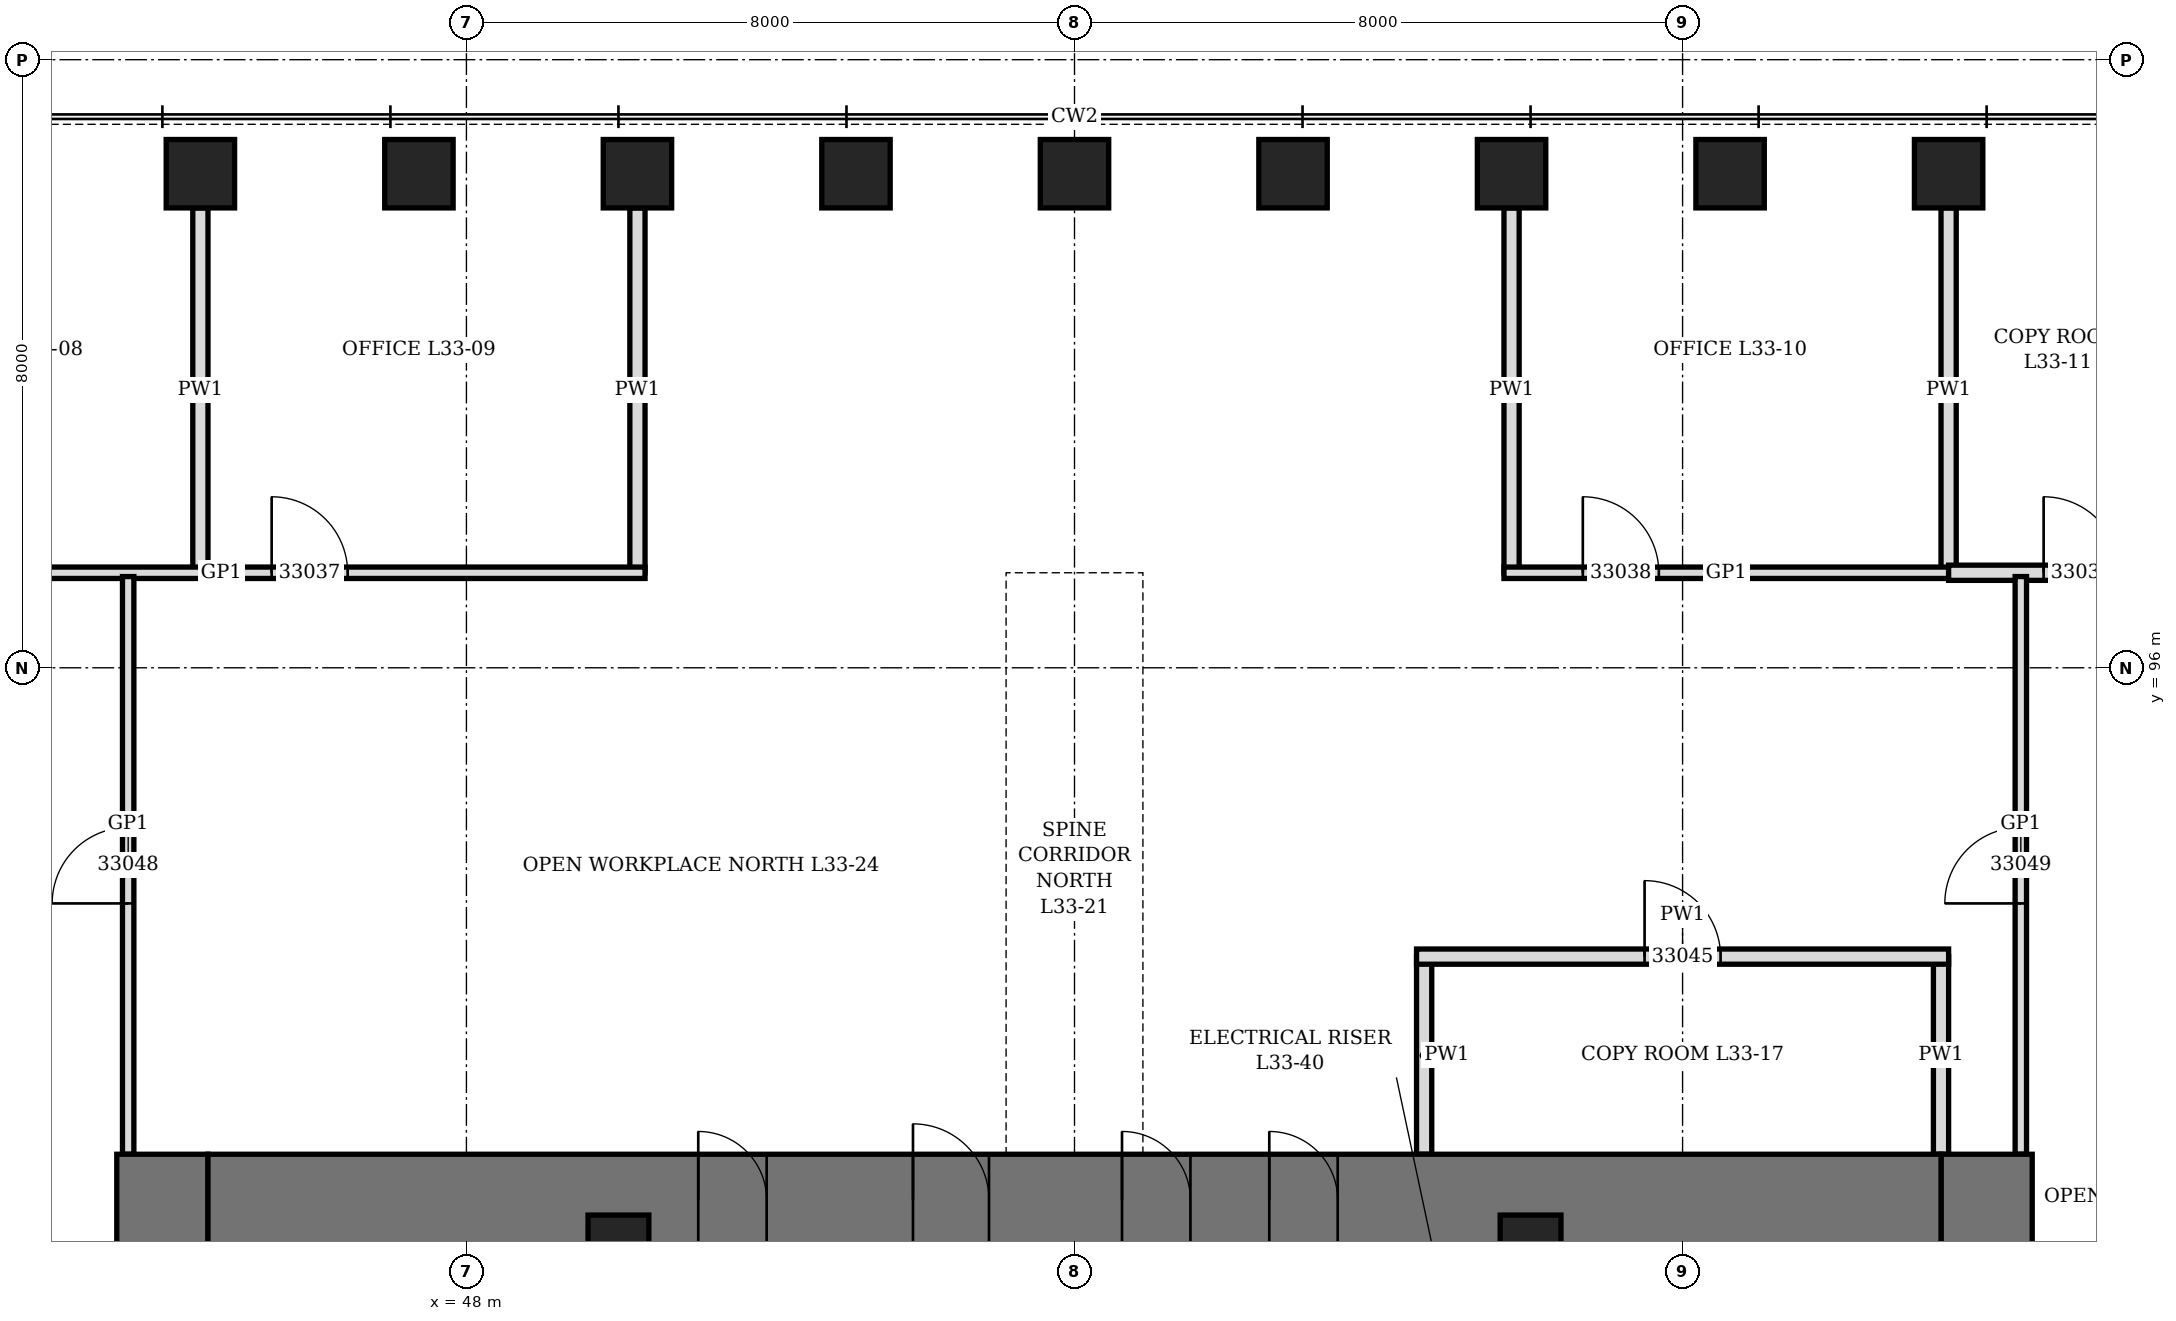
"""IFC4 building model, lengths in metres.
Left out: names, types, materials, properties, quantities, classifications, styles, units other than length and angle.
Written with IfcOpenShell. Run it as: python <this file> out.ifc"""

import sys

from ifc_helpers import new_model, si_unit, direction, frame, frame_2d, origin, origin_2d, place, context, subcontext, project, spatial, rectangle, hollow_rectangle, extrude, element, fill, save


model = new_model("IFC4")
c1 = context("Model", 3, precision=1e-05, world=origin(), true_north=direction((0.0, 1.0)))
c2 = subcontext(c1, "Body", "Model", "MODEL_VIEW")
j1 = project(units=[si_unit("LENGTHUNIT", "METRE"), si_unit("PLANEANGLEUNIT", "RADIAN")], contexts=[c1])
p1 = place(None, origin())
s1 = spatial("IfcSite", under=j1, at=p1, CompositionType="ELEMENT")
p2 = place(p1, origin())
s2 = spatial("IfcBuilding", under=s1, at=p2, CompositionType="ELEMENT")
p3 = place(p2, frame((0.0, 0.0, 150.1)))
s3 = spatial("IfcBuildingStorey", under=s2, at=p3, CompositionType="ELEMENT", Elevation=150.1)
for number, where, z_axis, x_axis in (
    (1, (67.5, 102.5, 0.0), (0.0, 0.0, 1.0), (1.0, 0.0, 0.0)),
    (2, (64.625, 102.5, 0.0), (0.0, 0.0, 1.0), (1.0, 0.0, 0.0)),
    (3, (61.75, 102.5, 0.0), (0.0, 0.0, 1.0), (1.0, 0.0, 0.0)),
    (4, (58.875, 102.5, 0.0), (0.0, 0.0, 1.0), (1.0, 0.0, 0.0)),
    (5, (56.0, 102.5, 0.0), (0.0, 0.0, 1.0), (1.0, 0.0, 0.0)),
    (6, (53.125, 102.5, 0.0), (0.0, 0.0, 1.0), (1.0, 0.0, 0.0)),
    (7, (50.25, 102.5, 0.0), (0.0, 0.0, 1.0), (1.0, 0.0, 0.0)),
    (8, (47.375, 102.5, 0.0), (0.0, 0.0, 1.0), (1.0, 0.0, 0.0)),
    (9, (44.5, 102.5, 0.0), (0.0, 0.0, 1.0), (1.0, 0.0, 0.0)),
):
    element("IfcColumn", number, at=place(p3, frame(where, z_axis=z_axis, x_axis=x_axis)), inside=s3, PredefinedType="COLUMN", context=c2, shape_type="SweptSolid", body=[
        extrude(hollow_rectangle(XDim=0.9, YDim=0.9, WallThickness=0.12, at=origin_2d()), origin(), (0.0, 0.0, 1.0), 4.2),
    ])
p4 = place(p3, frame((44.0, 70.4, 0.0), z_axis=(0.0, 0.0, 1.0), x_axis=(0.0, 1.0, 0.0)))
e10 = element("IfcWall", 10, at=p4, inside=s3, PredefinedType="SHEAR", context=c2, shape_type="SweptSolid", body=[
    extrude(rectangle(XDim=19.2, YDim=1.2, at=frame_2d((9.6, 0.0))), origin(), (0.0, 0.0, 1.0), 4.2),
])
p5 = place(p4, frame((8.6, 0.0, 0.0)))
e11 = element("IfcOpeningElement", 11, at=p5, cuts=e10, PredefinedType="OPENING", context=c2, shape_type="SweptSolid", body=[
    extrude(rectangle(XDim=2.0, YDim=2.4, at=frame_2d((1.0, 1.2))), frame((0.0, 0.61, 0.0), z_axis=(0.0, -1.0, 0.0), x_axis=(1.0, 0.0, 0.0)), (0.0, 0.0, 1.0), 1.22),
])
p6 = place(p3, frame((68.0, 70.4, 0.0), z_axis=(0.0, 0.0, 1.0), x_axis=(0.0, 1.0, 0.0)))
e12 = element("IfcWall", 12, at=p6, inside=s3, PredefinedType="SHEAR", context=c2, shape_type="SweptSolid", body=[
    extrude(rectangle(XDim=19.2, YDim=1.2, at=frame_2d((9.6, 0.0))), origin(), (0.0, 0.0, 1.0), 4.2),
])
p7 = place(p6, frame((8.6, 0.0, 0.0)))
e13 = element("IfcOpeningElement", 13, at=p7, cuts=e12, PredefinedType="OPENING", context=c2, shape_type="SweptSolid", body=[
    extrude(rectangle(XDim=2.0, YDim=2.4, at=frame_2d((1.0, 1.2))), frame((0.0, 0.61, 0.0), z_axis=(0.0, -1.0, 0.0), x_axis=(1.0, 0.0, 0.0)), (0.0, 0.0, 1.0), 1.22),
])
p8 = place(p3, frame((44.6, 89.0, 0.0), z_axis=(0.0, 0.0, 1.0), x_axis=(1.0, 0.0, 0.0)))
e14 = element("IfcWall", 14, at=p8, inside=s3, PredefinedType="SHEAR", context=c2, shape_type="SweptSolid", body=[
    extrude(rectangle(XDim=22.8, YDim=1.2, at=frame_2d((11.4, 0.0))), origin(), (0.0, 0.0, 1.0), 4.2),
])
p9 = place(p8, frame((9.275, 0.0, 0.0)))
e15 = element("IfcOpeningElement", 15, at=p9, cuts=e14, PredefinedType="OPENING", context=c2, shape_type="SweptSolid", body=[
    extrude(rectangle(XDim=1.0, YDim=2.1, at=frame_2d((0.5, 1.05))), frame((0.0, 0.61, 0.0), z_axis=(0.0, -1.0, 0.0), x_axis=(1.0, 0.0, 0.0)), (0.0, 0.0, 1.0), 1.22),
])
p10 = place(p8, frame((6.45, 0.0, 0.0)))
e16 = element("IfcOpeningElement", 16, at=p10, cuts=e14, PredefinedType="OPENING", context=c2, shape_type="SweptSolid", body=[
    extrude(rectangle(XDim=0.9, YDim=2.1, at=frame_2d((0.45, 1.05))), frame((0.0, 0.61, 0.0), z_axis=(0.0, -1.0, 0.0), x_axis=(1.0, 0.0, 0.0)), (0.0, 0.0, 1.0), 1.22),
])
p11 = place(p8, frame((12.025, 0.0, 0.0)))
e17 = element("IfcOpeningElement", 17, at=p11, cuts=e14, PredefinedType="OPENING", context=c2, shape_type="SweptSolid", body=[
    extrude(rectangle(XDim=0.9, YDim=2.1, at=frame_2d((0.45, 1.05))), frame((0.0, 0.61, 0.0), z_axis=(0.0, -1.0, 0.0), x_axis=(1.0, 0.0, 0.0)), (0.0, 0.0, 1.0), 1.22),
])
p12 = place(p8, frame((13.962, 0.0, 0.0)))
e18 = element("IfcOpeningElement", 18, at=p12, cuts=e14, PredefinedType="OPENING", context=c2, shape_type="SweptSolid", body=[
    extrude(rectangle(XDim=0.9, YDim=2.1, at=frame_2d((0.45, 1.05))), frame((0.0, 0.61, 0.0), z_axis=(0.0, -1.0, 0.0), x_axis=(1.0, 0.0, 0.0)), (0.0, 0.0, 1.0), 1.22),
])
for number, where, z_axis, x_axis in (
    (19, (50.0, 88.4, 0.0), (0.0, 0.0, 1.0), (1.0, 0.0, 0.0)),
    (20, (62.0, 88.4, 0.0), (0.0, 0.0, 1.0), (1.0, 0.0, 0.0)),
):
    element("IfcColumn", number, at=place(p3, frame(where, z_axis=z_axis, x_axis=x_axis)), inside=s3, PredefinedType="COLUMN", context=c2, shape_type="SweptSolid", body=[
        extrude(hollow_rectangle(XDim=0.8, YDim=0.8, WallThickness=0.1, at=origin_2d()), origin(), (0.0, 0.0, 1.0), 4.2),
    ])
p13 = place(p3, frame((44.5, 97.25, 0.0), z_axis=(0.0, 0.0, 1.0), x_axis=(0.0, 1.0, 0.0)))
e21 = element("IfcWall", 21, at=p13, inside=s3, PredefinedType="PARTITIONING", context=c2, shape_type="SweptSolid", body=[
    extrude(rectangle(XDim=4.8, YDim=0.2, at=frame_2d((2.4, 0.0))), origin(), (0.0, 0.0, 1.0), 2.74),
])
for number, where, z_axis, x_axis in (
    (22, (50.25, 97.25, 0.0), (0.0, 0.0, 1.0), (0.0, 1.0, 0.0)),
    (23, (61.75, 97.25, 0.0), (0.0, 0.0, 1.0), (0.0, 1.0, 0.0)),
):
    element("IfcWall", number, at=place(p3, frame(where, z_axis=z_axis, x_axis=x_axis)), inside=s3, PredefinedType="PARTITIONING", context=c2, shape_type="SweptSolid", body=[
        extrude(rectangle(XDim=4.8, YDim=0.2, at=frame_2d((2.4, 0.0))), origin(), (0.0, 0.0, 1.0), 3.278),
    ])
p14 = place(p3, frame((67.5, 97.25, 0.0), z_axis=(0.0, 0.0, 1.0), x_axis=(0.0, 1.0, 0.0)))
e24 = element("IfcWall", 24, at=p14, inside=s3, PredefinedType="PARTITIONING", context=c2, shape_type="SweptSolid", body=[
    extrude(rectangle(XDim=4.8, YDim=0.2, at=frame_2d((2.4, 0.0))), origin(), (0.0, 0.0, 1.0), 2.74),
])
p15 = place(p3, frame((60.6, 89.6, 0.0), z_axis=(0.0, 0.0, 1.0), x_axis=(0.0, 1.0, 0.0)))
e25 = element("IfcWall", 25, at=p15, inside=s3, PredefinedType="PARTITIONING", context=c2, shape_type="SweptSolid", body=[
    extrude(rectangle(XDim=2.6, YDim=0.2, at=frame_2d((1.3, 0.0))), origin(), (0.0, 0.0, 1.0), 4.04),
])
p16 = place(p3, frame((67.4, 89.6, 0.0), z_axis=(0.0, 0.0, 1.0), x_axis=(0.0, 1.0, 0.0)))
e26 = element("IfcWall", 26, at=p16, inside=s3, PredefinedType="PARTITIONING", context=c2, shape_type="SweptSolid", body=[
    extrude(rectangle(XDim=2.6, YDim=0.2, at=frame_2d((1.3, 0.0))), origin(), (0.0, 0.0, 1.0), 2.74),
])
p17 = place(p3, frame((60.5, 92.2, 0.0), z_axis=(0.0, 0.0, 1.0), x_axis=(1.0, 0.0, 0.0)))
e27 = element("IfcWall", 27, at=p17, inside=s3, PredefinedType="PARTITIONING", context=c2, shape_type="SweptSolid", body=[
    extrude(rectangle(XDim=7.0, YDim=0.2, at=frame_2d((3.5, 0.0))), origin(), (0.0, 0.0, 1.0), 4.04),
])
p18 = place(p17, frame((3.0, 0.0, 0.0)))
e28 = element("IfcOpeningElement", 28, at=p18, cuts=e27, PredefinedType="OPENING", context=c2, shape_type="SweptSolid", body=[
    extrude(rectangle(XDim=1.0, YDim=2.1, at=frame_2d((0.5, 1.05))), frame((0.0, 0.11, 0.0), z_axis=(0.0, -1.0, 0.0), x_axis=(1.0, 0.0, 0.0)), (0.0, 0.0, 1.0), 0.22),
])
p19 = place(p3, frame((39.2, 97.25, 0.0), z_axis=(0.0, 0.0, 1.0), x_axis=(1.0, 0.0, 0.0)))
e29 = element("IfcWall", 29, at=p19, inside=s3, PredefinedType="PARTITIONING", context=c2, shape_type="SweptSolid", body=[
    extrude(rectangle(XDim=11.15, YDim=0.15, at=frame_2d((5.575, 0.0))), origin(), (0.0, 0.0, 1.0), 4.04),
])
p20 = place(p19, frame((0.488, 0.0, 0.0)))
e30 = element("IfcOpeningElement", 30, at=p20, cuts=e29, PredefinedType="OPENING", context=c2, shape_type="SweptSolid", body=[
    extrude(rectangle(XDim=1.0, YDim=2.4, at=frame_2d((0.5, 1.2))), frame((0.0, 0.085, 0.0), z_axis=(0.0, -1.0, 0.0), x_axis=(1.0, 0.0, 0.0)), (0.0, 0.0, 1.0), 0.17),
])
p21 = place(p19, frame((6.238, 0.0, 0.0)))
e31 = element("IfcOpeningElement", 31, at=p21, cuts=e29, PredefinedType="OPENING", context=c2, shape_type="SweptSolid", body=[
    extrude(rectangle(XDim=1.0, YDim=2.1, at=frame_2d((0.5, 1.05))), frame((0.0, 0.085, 0.0), z_axis=(0.0, -1.0, 0.0), x_axis=(1.0, 0.0, 0.0)), (0.0, 0.0, 1.0), 0.17),
])
p22 = place(p3, frame((61.65, 97.25, 0.0), z_axis=(0.0, 0.0, 1.0), x_axis=(1.0, 0.0, 0.0)))
e32 = element("IfcWall", 32, at=p22, inside=s3, PredefinedType="PARTITIONING", context=c2, shape_type="SweptSolid", body=[
    extrude(rectangle(XDim=5.85, YDim=0.15, at=frame_2d((2.925, 0.0))), origin(), (0.0, 0.0, 1.0), 4.04),
])
p23 = place(p22, frame((1.038, 0.0, 0.0)))
e33 = element("IfcOpeningElement", 33, at=p23, cuts=e32, PredefinedType="OPENING", context=c2, shape_type="SweptSolid", body=[
    extrude(rectangle(XDim=1.0, YDim=2.1, at=frame_2d((0.5, 1.05))), frame((0.0, 0.085, 0.0), z_axis=(0.0, -1.0, 0.0), x_axis=(1.0, 0.0, 0.0)), (0.0, 0.0, 1.0), 0.17),
])
p24 = place(p3, frame((67.5, 97.25, 0.0), z_axis=(0.0, 0.0, 1.0), x_axis=(1.0, 0.0, 0.0)))
e34 = element("IfcWall", 34, at=p24, inside=s3, PredefinedType="PARTITIONING", context=c2, shape_type="SweptSolid", body=[
    extrude(rectangle(XDim=5.3, YDim=0.2, at=frame_2d((2.65, 0.0))), origin(), (0.0, 0.0, 1.0), 4.04),
])
p25 = place(p24, frame((1.25, 0.0, 0.0)))
e35 = element("IfcOpeningElement", 35, at=p25, cuts=e34, PredefinedType="OPENING", context=c2, shape_type="SweptSolid", body=[
    extrude(rectangle(XDim=1.0, YDim=2.1, at=frame_2d((0.5, 1.05))), frame((0.0, 0.11, 0.0), z_axis=(0.0, -1.0, 0.0), x_axis=(1.0, 0.0, 0.0)), (0.0, 0.0, 1.0), 0.22),
])
p26 = place(p24, frame((3.812, 0.0, 0.0)))
e36 = element("IfcOpeningElement", 36, at=p26, cuts=e34, PredefinedType="OPENING", context=c2, shape_type="SweptSolid", body=[
    extrude(rectangle(XDim=1.0, YDim=2.1, at=frame_2d((0.5, 1.05))), frame((0.0, 0.11, 0.0), z_axis=(0.0, -1.0, 0.0), x_axis=(1.0, 0.0, 0.0)), (0.0, 0.0, 1.0), 0.22),
])
p27 = place(p3, frame((43.55, 89.6, 0.0), z_axis=(0.0, 0.0, 1.0), x_axis=(0.0, 1.0, 0.0)))
e37 = element("IfcWall", 37, at=p27, inside=s3, PredefinedType="PARTITIONING", context=c2, shape_type="SweptSolid", body=[
    extrude(rectangle(XDim=7.6, YDim=0.15, at=frame_2d((3.8, 0.0))), origin(), (0.0, 0.0, 1.0), 4.04),
])
p28 = place(p27, frame((3.3, 0.0, 0.0)))
e38 = element("IfcOpeningElement", 38, at=p28, cuts=e37, PredefinedType="OPENING", context=c2, shape_type="SweptSolid", body=[
    extrude(rectangle(XDim=1.0, YDim=2.4, at=frame_2d((0.5, 1.2))), frame((0.0, 0.085, 0.0), z_axis=(0.0, -1.0, 0.0), x_axis=(1.0, 0.0, 0.0)), (0.0, 0.0, 1.0), 0.17),
])
p29 = place(p3, frame((68.45, 89.6, 0.0), z_axis=(0.0, 0.0, 1.0), x_axis=(0.0, 1.0, 0.0)))
e39 = element("IfcWall", 39, at=p29, inside=s3, PredefinedType="PARTITIONING", context=c2, shape_type="SweptSolid", body=[
    extrude(rectangle(XDim=7.6, YDim=0.15, at=frame_2d((3.8, 0.0))), origin(), (0.0, 0.0, 1.0), 4.04),
])
p30 = place(p29, frame((3.3, 0.0, 0.0)))
e40 = element("IfcOpeningElement", 40, at=p30, cuts=e39, PredefinedType="OPENING", context=c2, shape_type="SweptSolid", body=[
    extrude(rectangle(XDim=1.0, YDim=2.4, at=frame_2d((0.5, 1.2))), frame((0.0, 0.085, 0.0), z_axis=(0.0, -1.0, 0.0), x_axis=(1.0, 0.0, 0.0)), (0.0, 0.0, 1.0), 0.17),
])
p31 = place(p9, origin())
e41 = element("IfcDoor", 41, at=p31, inside=s3, OperationType="SINGLE_SWING_LEFT", PredefinedType="DOOR", context=c2, shape_type="SweptSolid", body=[
    extrude(rectangle(XDim=1.0, YDim=2.1, at=frame_2d((0.5, 1.05))), frame((0.0, 0.35, 0.0), z_axis=(0.0, -1.0, 0.0), x_axis=(1.0, 0.0, 0.0)), (0.0, 0.0, 1.0), 0.7),
])
fill(e15, e41)
p32 = place(p10, origin())
e42 = element("IfcDoor", 42, at=p32, inside=s3, OperationType="SINGLE_SWING_LEFT", PredefinedType="DOOR", context=c2, shape_type="SweptSolid", body=[
    extrude(rectangle(XDim=0.9, YDim=2.1, at=frame_2d((0.45, 1.05))), frame((0.0, 0.35, 0.0), z_axis=(0.0, -1.0, 0.0), x_axis=(1.0, 0.0, 0.0)), (0.0, 0.0, 1.0), 0.7),
])
fill(e16, e42)
p33 = place(p11, origin())
e43 = element("IfcDoor", 43, at=p33, inside=s3, OperationType="SINGLE_SWING_LEFT", PredefinedType="DOOR", context=c2, shape_type="SweptSolid", body=[
    extrude(rectangle(XDim=0.9, YDim=2.1, at=frame_2d((0.45, 1.05))), frame((0.0, 0.35, 0.0), z_axis=(0.0, -1.0, 0.0), x_axis=(1.0, 0.0, 0.0)), (0.0, 0.0, 1.0), 0.7),
])
fill(e17, e43)
p34 = place(p12, origin())
e44 = element("IfcDoor", 44, at=p34, inside=s3, OperationType="SINGLE_SWING_LEFT", PredefinedType="DOOR", context=c2, shape_type="SweptSolid", body=[
    extrude(rectangle(XDim=0.9, YDim=2.1, at=frame_2d((0.45, 1.05))), frame((0.0, 0.35, 0.0), z_axis=(0.0, -1.0, 0.0), x_axis=(1.0, 0.0, 0.0)), (0.0, 0.0, 1.0), 0.7),
])
fill(e18, e44)
p35 = place(p21, origin())
e45 = element("IfcDoor", 45, at=p35, inside=s3, OperationType="SINGLE_SWING_LEFT", PredefinedType="DOOR", context=c2, shape_type="SweptSolid", body=[
    extrude(rectangle(XDim=1.0, YDim=2.1, at=frame_2d((0.5, 1.05))), frame((0.0, 0.075, 0.0), z_axis=(0.0, -1.0, 0.0), x_axis=(1.0, 0.0, 0.0)), (0.0, 0.0, 1.0), 0.149),
])
fill(e31, e45)
p36 = place(p23, origin())
e46 = element("IfcDoor", 46, at=p36, inside=s3, OperationType="SINGLE_SWING_LEFT", PredefinedType="DOOR", context=c2, shape_type="SweptSolid", body=[
    extrude(rectangle(XDim=1.0, YDim=2.1, at=frame_2d((0.5, 1.05))), frame((0.0, 0.075, 0.0), z_axis=(0.0, -1.0, 0.0), x_axis=(1.0, 0.0, 0.0)), (0.0, 0.0, 1.0), 0.149),
])
fill(e33, e46)
p37 = place(p25, origin())
e47 = element("IfcDoor", 47, at=p37, inside=s3, OperationType="SINGLE_SWING_LEFT", PredefinedType="DOOR", context=c2, shape_type="SweptSolid", body=[
    extrude(rectangle(XDim=1.0, YDim=2.1, at=frame_2d((0.5, 1.05))), frame((0.0, 0.1, 0.0), z_axis=(0.0, -1.0, 0.0), x_axis=(1.0, 0.0, 0.0)), (0.0, 0.0, 1.0), 0.199),
])
fill(e35, e47)
p38 = place(p18, origin())
e48 = element("IfcDoor", 48, at=p38, inside=s3, OperationType="SINGLE_SWING_LEFT", PredefinedType="DOOR", context=c2, shape_type="SweptSolid", body=[
    extrude(rectangle(XDim=1.0, YDim=2.1, at=frame_2d((0.5, 1.05))), frame((0.0, 0.1, 0.0), z_axis=(0.0, -1.0, 0.0), x_axis=(1.0, 0.0, 0.0)), (0.0, 0.0, 1.0), 0.199),
])
fill(e28, e48)
p39 = place(p28, origin())
e49 = element("IfcDoor", 49, at=p39, inside=s3, OperationType="SINGLE_SWING_RIGHT", PredefinedType="DOOR", context=c2, shape_type="SweptSolid", body=[
    extrude(rectangle(XDim=1.0, YDim=2.4, at=frame_2d((0.5, 1.2))), frame((0.0, 0.075, 0.0), z_axis=(0.0, -1.0, 0.0), x_axis=(1.0, 0.0, 0.0)), (0.0, 0.0, 1.0), 0.149),
])
fill(e38, e49)
p40 = place(p30, origin())
e50 = element("IfcDoor", 50, at=p40, inside=s3, OperationType="SINGLE_SWING_RIGHT", PredefinedType="DOOR", context=c2, shape_type="SweptSolid", body=[
    extrude(rectangle(XDim=1.0, YDim=2.4, at=frame_2d((0.5, 1.2))), frame((0.0, 0.075, 0.0), z_axis=(0.0, -1.0, 0.0), x_axis=(1.0, 0.0, 0.0)), (0.0, 0.0, 1.0), 0.149),
])
fill(e40, e50)
save(model, sys.argv[1])
